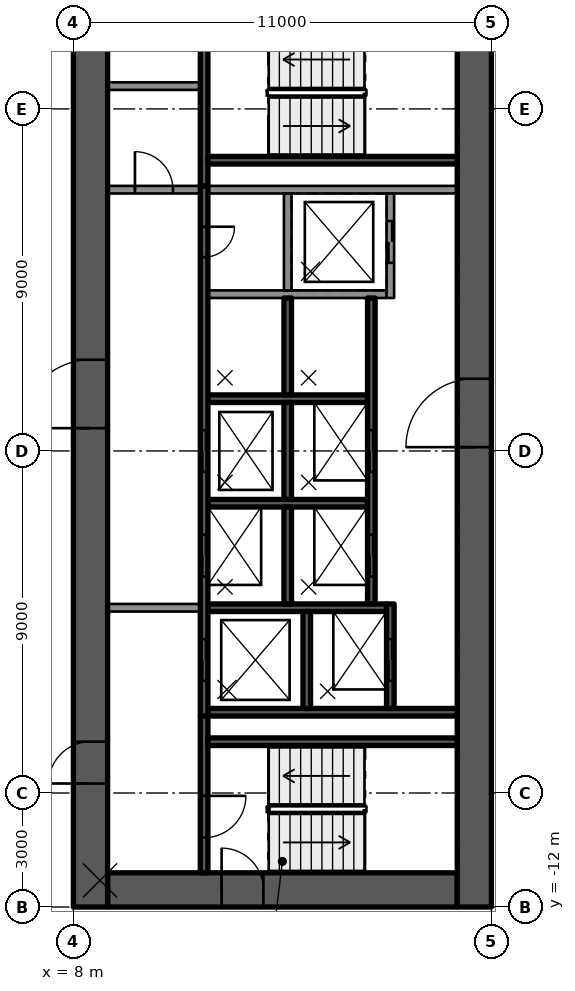
"""IFC4 building model, lengths in metres.
Left out: names, types, materials, properties, quantities, classifications, styles, units other than length and angle.
Written with IfcOpenShell. Run it as: python <this file> out.ifc"""

import sys

from ifc_helpers import new_model, si_unit, direction, frame, frame_2d, origin, place, context, subcontext, project, spatial, rectangle, extrude, element, fill, save


model = new_model("IFC4")
c1 = context("Model", 3, precision=1e-05, world=origin(), true_north=direction((0.0, 1.0)))
c2 = subcontext(c1, "Body", "Model", "MODEL_VIEW")
j1 = project(units=[si_unit("LENGTHUNIT", "METRE"), si_unit("PLANEANGLEUNIT", "RADIAN")], contexts=[c1])
p1 = place(None, origin())
s1 = spatial("IfcSite", under=j1, at=p1, CompositionType="ELEMENT")
p2 = place(p1, origin())
s2 = spatial("IfcBuilding", under=s1, at=p2, CompositionType="ELEMENT")
p3 = place(p2, frame((0.0, 0.0, 134.2)))
s3 = spatial("IfcBuildingStorey", under=s2, at=p3, CompositionType="ELEMENT", Elevation=134.2)
p4 = place(p3, frame((8.9, -11.55, 0.0), z_axis=(0.0, 0.0, 1.0), x_axis=(1.0, 0.0, 0.0)))
e1 = element("IfcWall", 1, at=p4, inside=s3, PredefinedType="SHEAR", context=c2, shape_type="SweptSolid", body=[
    extrude(rectangle(XDim=9.2, YDim=0.9, at=frame_2d((4.6, 0.0))), origin(), (0.0, 0.0, 1.0), 3.5),
])
p5 = place(p4, frame((3.0, 0.0, 0.0)))
e2 = element("IfcOpeningElement", 2, at=p5, cuts=e1, PredefinedType="OPENING", context=c2, shape_type="SweptSolid", body=[
    extrude(rectangle(XDim=1.1, YDim=2.1, at=frame_2d((0.55, 1.05))), frame((0.0, 0.46, 0.0), z_axis=(0.0, -1.0, 0.0), x_axis=(1.0, 0.0, 0.0)), (0.0, 0.0, 1.0), 0.92),
])
p6 = place(p3, frame((8.45, -12.0, 0.0), z_axis=(0.0, 0.0, 1.0), x_axis=(0.0, 1.0, 0.0)))
e3 = element("IfcWall", 3, at=p6, inside=s3, PredefinedType="SHEAR", context=c2, shape_type="SweptSolid", body=[
    extrude(rectangle(XDim=24.0, YDim=0.9, at=frame_2d((12.0, 0.0))), origin(), (0.0, 0.0, 1.0), 3.5),
])
p7 = place(p6, frame((12.6, 0.0, 0.0)))
e4 = element("IfcOpeningElement", 4, at=p7, cuts=e3, PredefinedType="OPENING", context=c2, shape_type="SweptSolid", body=[
    extrude(rectangle(XDim=1.8, YDim=2.1, at=frame_2d((0.9, 1.05))), frame((0.0, 0.46, 0.0), z_axis=(0.0, -1.0, 0.0), x_axis=(1.0, 0.0, 0.0)), (0.0, 0.0, 1.0), 0.92),
])
p8 = place(p6, frame((3.25, 0.0, 0.0)))
e5 = element("IfcOpeningElement", 5, at=p8, cuts=e3, PredefinedType="OPENING", context=c2, shape_type="SweptSolid", body=[
    extrude(rectangle(XDim=1.1, YDim=2.1, at=frame_2d((0.55, 1.05))), frame((0.0, 0.46, 0.0), z_axis=(0.0, -1.0, 0.0), x_axis=(1.0, 0.0, 0.0)), (0.0, 0.0, 1.0), 0.92),
])
p9 = place(p3, frame((18.55, -12.0, 0.0), z_axis=(0.0, 0.0, 1.0), x_axis=(0.0, 1.0, 0.0)))
e6 = element("IfcWall", 6, at=p9, inside=s3, PredefinedType="SHEAR", context=c2, shape_type="SweptSolid", body=[
    extrude(rectangle(XDim=24.0, YDim=0.9, at=frame_2d((12.0, 0.0))), origin(), (0.0, 0.0, 1.0), 3.5),
])
p10 = place(p9, frame((12.1, 0.0, 0.0)))
e7 = element("IfcOpeningElement", 7, at=p10, cuts=e6, PredefinedType="OPENING", context=c2, shape_type="SweptSolid", body=[
    extrude(rectangle(XDim=1.8, YDim=2.1, at=frame_2d((0.9, 1.05))), frame((0.0, 0.46, 0.0), z_axis=(0.0, -1.0, 0.0), x_axis=(1.0, 0.0, 0.0)), (0.0, 0.0, 1.0), 0.92),
])
for number, where, z_axis, x_axis in (
    (8, (11.54, -6.875, 0.0), (0.0, 0.0, 1.0), (1.0, 0.0, 0.0)),
    (9, (11.54, 6.875, 0.0), (0.0, 0.0, 1.0), (1.0, 0.0, 0.0)),
):
    element("IfcWall", number, at=place(p3, frame(where, z_axis=z_axis, x_axis=x_axis)), inside=s3, PredefinedType="SOLIDWALL", context=c2, shape_type="SweptSolid", body=[
        extrude(rectangle(XDim=6.56, YDim=0.2, at=frame_2d((3.28, 0.0))), origin(), (0.0, 0.0, 1.0), 3.09),
    ])
p11 = place(p3, frame((11.54, 4.125, 0.0), z_axis=(0.0, 0.0, 1.0), x_axis=(1.0, 0.0, 0.0)))
e10 = element("IfcWall", 10, at=p11, inside=s3, PredefinedType="SOLIDWALL", context=c2, shape_type="SweptSolid", body=[
    extrude(rectangle(XDim=4.7, YDim=0.2, at=frame_2d((2.35, 0.0))), origin(), (0.0, 0.0, 1.0), 3.09),
])
for number, where, z_axis, x_axis in (
    (11, (11.54, 1.375, 0.0), (0.0, 0.0, 1.0), (1.0, 0.0, 0.0)),
    (12, (11.54, -1.375, 0.0), (0.0, 0.0, 1.0), (1.0, 0.0, 0.0)),
):
    element("IfcWall", number, at=place(p3, frame(where, z_axis=z_axis, x_axis=x_axis)), inside=s3, PredefinedType="SOLIDWALL", context=c2, shape_type="SweptSolid", body=[
        extrude(rectangle(XDim=4.2, YDim=0.2, at=frame_2d((2.1, 0.0))), origin(), (0.0, 0.0, 1.0), 3.09),
    ])
p12 = place(p3, frame((11.54, -4.125, 0.0), z_axis=(0.0, 0.0, 1.0), x_axis=(1.0, 0.0, 0.0)))
e13 = element("IfcWall", 13, at=p12, inside=s3, PredefinedType="SOLIDWALL", context=c2, shape_type="SweptSolid", body=[
    extrude(rectangle(XDim=4.7, YDim=0.2, at=frame_2d((2.35, 0.0))), origin(), (0.0, 0.0, 1.0), 3.09),
])
p13 = place(p3, frame((11.44, 6.975, 0.0), z_axis=(0.0, 0.0, 1.0), x_axis=(0.0, -1.0, 0.0)))
e14 = element("IfcWall", 14, at=p13, inside=s3, PredefinedType="SOLIDWALL", context=c2, shape_type="SweptSolid", body=[
    extrude(rectangle(XDim=13.95, YDim=0.2, at=frame_2d((6.975, 0.0))), origin(), (0.0, 0.0, 1.0), 3.09),
])
p14 = place(p13, frame((6.425, 0.0, 0.0)))
e15 = element("IfcOpeningElement", 15, at=p14, cuts=e14, PredefinedType="OPENING", context=c2, shape_type="SweptSolid", body=[
    extrude(rectangle(XDim=1.1, YDim=2.1, at=frame_2d((0.55, 1.05))), frame((0.0, 0.11, 0.0), z_axis=(0.0, -1.0, 0.0), x_axis=(1.0, 0.0, 0.0)), (0.0, 0.0, 1.0), 0.22),
])
p15 = place(p13, frame((9.175, 0.0, 0.0)))
e16 = element("IfcOpeningElement", 16, at=p15, cuts=e14, PredefinedType="OPENING", context=c2, shape_type="SweptSolid", body=[
    extrude(rectangle(XDim=1.1, YDim=2.1, at=frame_2d((0.55, 1.05))), frame((0.0, 0.11, 0.0), z_axis=(0.0, -1.0, 0.0), x_axis=(1.0, 0.0, 0.0)), (0.0, 0.0, 1.0), 0.22),
])
p16 = place(p13, frame((11.925, 0.0, 0.0)))
e17 = element("IfcOpeningElement", 17, at=p16, cuts=e14, PredefinedType="OPENING", context=c2, shape_type="SweptSolid", body=[
    extrude(rectangle(XDim=1.1, YDim=2.1, at=frame_2d((0.55, 1.05))), frame((0.0, 0.11, 0.0), z_axis=(0.0, -1.0, 0.0), x_axis=(1.0, 0.0, 0.0)), (0.0, 0.0, 1.0), 0.22),
])
p17 = place(p13, frame((1.075, 0.0, 0.0)))
e18 = element("IfcOpeningElement", 18, at=p17, cuts=e14, PredefinedType="OPENING", context=c2, shape_type="SweptSolid", body=[
    extrude(rectangle(XDim=0.8, YDim=2.1, at=frame_2d((0.4, 1.05))), frame((0.0, 0.11, 0.0), z_axis=(0.0, -1.0, 0.0), x_axis=(1.0, 0.0, 0.0)), (0.0, 0.0, 1.0), 0.22),
])
for number, where, z_axis, x_axis in (
    (19, (13.64, 6.775, 0.0), (0.0, 0.0, 1.0), (0.0, -1.0, 0.0)),
    (20, (13.64, 4.025, 0.0), (0.0, 0.0, 1.0), (0.0, -1.0, 0.0)),
    (21, (13.64, 1.275, 0.0), (0.0, 0.0, 1.0), (0.0, -1.0, 0.0)),
    (22, (13.64, -1.475, 0.0), (0.0, 0.0, 1.0), (0.0, -1.0, 0.0)),
    (23, (14.14, -4.225, 0.0), (0.0, 0.0, 1.0), (0.0, -1.0, 0.0)),
):
    element("IfcWall", number, at=place(p3, frame(where, z_axis=z_axis, x_axis=x_axis)), inside=s3, PredefinedType="SOLIDWALL", context=c2, shape_type="SweptSolid", body=[
        extrude(rectangle(XDim=2.55, YDim=0.2, at=frame_2d((1.275, 0.0))), origin(), (0.0, 0.0, 1.0), 3.09),
    ])
p18 = place(p3, frame((16.34, 6.775, 0.0), z_axis=(0.0, 0.0, 1.0), x_axis=(0.0, -1.0, 0.0)))
e24 = element("IfcWall", 24, at=p18, inside=s3, PredefinedType="SOLIDWALL", context=c2, shape_type="SweptSolid", body=[
    extrude(rectangle(XDim=2.75, YDim=0.2, at=frame_2d((1.375, 0.0))), origin(), (0.0, 0.0, 1.0), 3.09),
])
p19 = place(p18, frame((0.725, 0.0, 0.0)))
e25 = element("IfcOpeningElement", 25, at=p19, cuts=e24, PredefinedType="OPENING", context=c2, shape_type="SweptSolid", body=[
    extrude(rectangle(XDim=1.1, YDim=2.1, at=frame_2d((0.55, 1.05))), frame((0.0, 0.11, 0.0), z_axis=(0.0, -1.0, 0.0), x_axis=(1.0, 0.0, 0.0)), (0.0, 0.0, 1.0), 0.22),
])
p20 = place(p3, frame((15.84, 4.025, 0.0), z_axis=(0.0, 0.0, 1.0), x_axis=(0.0, -1.0, 0.0)))
e26 = element("IfcWall", 26, at=p20, inside=s3, PredefinedType="SOLIDWALL", context=c2, shape_type="SweptSolid", body=[
    extrude(rectangle(XDim=8.05, YDim=0.2, at=frame_2d((4.025, 0.0))), origin(), (0.0, 0.0, 1.0), 3.09),
])
p21 = place(p20, frame((3.475, 0.0, 0.0)))
e27 = element("IfcOpeningElement", 27, at=p21, cuts=e26, PredefinedType="OPENING", context=c2, shape_type="SweptSolid", body=[
    extrude(rectangle(XDim=1.1, YDim=2.1, at=frame_2d((0.55, 1.05))), frame((0.0, 0.11, 0.0), z_axis=(0.0, -1.0, 0.0), x_axis=(1.0, 0.0, 0.0)), (0.0, 0.0, 1.0), 0.22),
])
p22 = place(p20, frame((6.225, 0.0, 0.0)))
e28 = element("IfcOpeningElement", 28, at=p22, cuts=e26, PredefinedType="OPENING", context=c2, shape_type="SweptSolid", body=[
    extrude(rectangle(XDim=1.1, YDim=2.1, at=frame_2d((0.55, 1.05))), frame((0.0, 0.11, 0.0), z_axis=(0.0, -1.0, 0.0), x_axis=(1.0, 0.0, 0.0)), (0.0, 0.0, 1.0), 0.22),
])
p23 = place(p3, frame((16.34, -4.025, 0.0), z_axis=(0.0, 0.0, 1.0), x_axis=(0.0, -1.0, 0.0)))
e29 = element("IfcWall", 29, at=p23, inside=s3, PredefinedType="SOLIDWALL", context=c2, shape_type="SweptSolid", body=[
    extrude(rectangle(XDim=2.75, YDim=0.2, at=frame_2d((1.375, 0.0))), origin(), (0.0, 0.0, 1.0), 3.09),
])
p24 = place(p23, frame((0.925, 0.0, 0.0)))
e30 = element("IfcOpeningElement", 30, at=p24, cuts=e29, PredefinedType="OPENING", context=c2, shape_type="SweptSolid", body=[
    extrude(rectangle(XDim=1.1, YDim=2.1, at=frame_2d((0.55, 1.05))), frame((0.0, 0.11, 0.0), z_axis=(0.0, -1.0, 0.0), x_axis=(1.0, 0.0, 0.0)), (0.0, 0.0, 1.0), 0.22),
])
p25 = place(p3, frame((11.44, -6.975, 0.0), z_axis=(0.0, 0.0, 1.0), x_axis=(0.0, -1.0, 0.0)))
e31 = element("IfcWall", 31, at=p25, inside=s3, PredefinedType="SOLIDWALL", context=c2, shape_type="SweptSolid", body=[
    extrude(rectangle(XDim=4.125, YDim=0.2, at=frame_2d((2.062, 0.0))), origin(), (0.0, 0.0, 1.0), 3.09),
])
p26 = place(p25, frame((2.1, 0.0, 0.0)))
e32 = element("IfcOpeningElement", 32, at=p26, cuts=e31, PredefinedType="OPENING", context=c2, shape_type="SweptSolid", body=[
    extrude(rectangle(XDim=1.1, YDim=2.1, at=frame_2d((0.55, 1.05))), frame((0.0, 0.11, 0.0), z_axis=(0.0, -1.0, 0.0), x_axis=(1.0, 0.0, 0.0)), (0.0, 0.0, 1.0), 0.22),
])
p27 = place(p3, frame((11.54, -7.65, 0.0), z_axis=(0.0, 0.0, 1.0), x_axis=(1.0, 0.0, 0.0)))
e33 = element("IfcWall", 33, at=p27, inside=s3, PredefinedType="SOLIDWALL", context=c2, shape_type="SweptSolid", body=[
    extrude(rectangle(XDim=6.56, YDim=0.2, at=frame_2d((3.28, 0.0))), origin(), (0.0, 0.0, 1.0), 3.09),
])
p28 = place(p3, frame((11.44, 11.1, 0.0), z_axis=(0.0, 0.0, 1.0), x_axis=(0.0, -1.0, 0.0)))
e34 = element("IfcWall", 34, at=p28, inside=s3, PredefinedType="SOLIDWALL", context=c2, shape_type="SweptSolid", body=[
    extrude(rectangle(XDim=4.125, YDim=0.2, at=frame_2d((2.062, 0.0))), origin(), (0.0, 0.0, 1.0), 3.09),
])
p29 = place(p3, frame((11.54, 7.65, 0.0), z_axis=(0.0, 0.0, 1.0), x_axis=(1.0, 0.0, 0.0)))
e35 = element("IfcWall", 35, at=p29, inside=s3, PredefinedType="SOLIDWALL", context=c2, shape_type="SweptSolid", body=[
    extrude(rectangle(XDim=6.56, YDim=0.2, at=frame_2d((3.28, 0.0))), origin(), (0.0, 0.0, 1.0), 3.09),
])
p30 = place(p3, frame((8.9, -4.125, 0.0), z_axis=(0.0, 0.0, 1.0), x_axis=(1.0, 0.0, 0.0)))
e36 = element("IfcWall", 36, at=p30, inside=s3, PredefinedType="PARTITIONING", context=c2, shape_type="SweptSolid", body=[
    extrude(rectangle(XDim=2.44, YDim=0.2, at=frame_2d((1.22, 0.0))), origin(), (0.0, 0.0, 1.0), 3.09),
])
p31 = place(p3, frame((8.9, 6.875, 0.0), z_axis=(0.0, 0.0, 1.0), x_axis=(1.0, 0.0, 0.0)))
e37 = element("IfcWall", 37, at=p31, inside=s3, PredefinedType="PARTITIONING", context=c2, shape_type="SweptSolid", body=[
    extrude(rectangle(XDim=2.44, YDim=0.2, at=frame_2d((1.22, 0.0))), origin(), (0.0, 0.0, 1.0), 3.09),
])
p32 = place(p31, frame((0.72, 0.0, 0.0)))
e38 = element("IfcOpeningElement", 38, at=p32, cuts=e37, PredefinedType="OPENING", context=c2, shape_type="SweptSolid", body=[
    extrude(rectangle(XDim=1.0, YDim=2.1, at=frame_2d((0.5, 1.05))), frame((0.0, 0.11, 0.0), z_axis=(0.0, -1.0, 0.0), x_axis=(1.0, 0.0, 0.0)), (0.0, 0.0, 1.0), 0.22),
])
p33 = place(p3, frame((8.9, 9.6, 0.0), z_axis=(0.0, 0.0, 1.0), x_axis=(1.0, 0.0, 0.0)))
e39 = element("IfcWall", 39, at=p33, inside=s3, PredefinedType="PARTITIONING", context=c2, shape_type="SweptSolid", body=[
    extrude(rectangle(XDim=2.44, YDim=0.2, at=frame_2d((1.22, 0.0))), origin(), (0.0, 0.0, 1.0), 3.09),
])
p34 = place(p19, origin())
e40 = element("IfcDoor", 40, at=p34, inside=s3, OperationType="DOUBLE_DOOR_SLIDING", PredefinedType="DOOR", context=c2, shape_type="SweptSolid", body=[
    extrude(rectangle(XDim=1.1, YDim=2.1, at=frame_2d((0.55, 1.05))), frame((0.0, 0.025, 0.0), z_axis=(0.0, -1.0, 0.0), x_axis=(1.0, 0.0, 0.0)), (0.0, 0.0, 1.0), 0.05),
])
fill(e25, e40)
p35 = place(p14, origin())
e41 = element("IfcDoor", 41, at=p35, inside=s3, OperationType="DOUBLE_DOOR_SLIDING", PredefinedType="DOOR", context=c2, shape_type="SweptSolid", body=[
    extrude(rectangle(XDim=1.1, YDim=2.1, at=frame_2d((0.55, 1.05))), frame((0.0, 0.025, 0.0), z_axis=(0.0, -1.0, 0.0), x_axis=(1.0, 0.0, 0.0)), (0.0, 0.0, 1.0), 0.05),
])
fill(e15, e41)
p36 = place(p21, origin())
e42 = element("IfcDoor", 42, at=p36, inside=s3, OperationType="DOUBLE_DOOR_SLIDING", PredefinedType="DOOR", context=c2, shape_type="SweptSolid", body=[
    extrude(rectangle(XDim=1.1, YDim=2.1, at=frame_2d((0.55, 1.05))), frame((0.0, 0.025, 0.0), z_axis=(0.0, -1.0, 0.0), x_axis=(1.0, 0.0, 0.0)), (0.0, 0.0, 1.0), 0.05),
])
fill(e27, e42)
p37 = place(p15, origin())
e43 = element("IfcDoor", 43, at=p37, inside=s3, OperationType="DOUBLE_DOOR_SLIDING", PredefinedType="DOOR", context=c2, shape_type="SweptSolid", body=[
    extrude(rectangle(XDim=1.1, YDim=2.1, at=frame_2d((0.55, 1.05))), frame((0.0, 0.025, 0.0), z_axis=(0.0, -1.0, 0.0), x_axis=(1.0, 0.0, 0.0)), (0.0, 0.0, 1.0), 0.05),
])
fill(e16, e43)
p38 = place(p22, origin())
e44 = element("IfcDoor", 44, at=p38, inside=s3, OperationType="DOUBLE_DOOR_SLIDING", PredefinedType="DOOR", context=c2, shape_type="SweptSolid", body=[
    extrude(rectangle(XDim=1.1, YDim=2.1, at=frame_2d((0.55, 1.05))), frame((0.0, 0.025, 0.0), z_axis=(0.0, -1.0, 0.0), x_axis=(1.0, 0.0, 0.0)), (0.0, 0.0, 1.0), 0.05),
])
fill(e28, e44)
p39 = place(p16, origin())
e45 = element("IfcDoor", 45, at=p39, inside=s3, OperationType="DOUBLE_DOOR_SLIDING", PredefinedType="DOOR", context=c2, shape_type="SweptSolid", body=[
    extrude(rectangle(XDim=1.1, YDim=2.1, at=frame_2d((0.55, 1.05))), frame((0.0, 0.025, 0.0), z_axis=(0.0, -1.0, 0.0), x_axis=(1.0, 0.0, 0.0)), (0.0, 0.0, 1.0), 0.05),
])
fill(e17, e45)
p40 = place(p24, origin())
e46 = element("IfcDoor", 46, at=p40, inside=s3, OperationType="DOUBLE_DOOR_SLIDING", PredefinedType="DOOR", context=c2, shape_type="SweptSolid", body=[
    extrude(rectangle(XDim=1.1, YDim=2.1, at=frame_2d((0.55, 1.05))), frame((0.0, 0.025, 0.0), z_axis=(0.0, -1.0, 0.0), x_axis=(1.0, 0.0, 0.0)), (0.0, 0.0, 1.0), 0.05),
])
fill(e30, e46)
p41 = place(p17, origin())
e47 = element("IfcDoor", 47, at=p41, inside=s3, OperationType="SINGLE_SWING_LEFT", PredefinedType="DOOR", context=c2, shape_type="SweptSolid", body=[
    extrude(rectangle(XDim=0.8, YDim=2.1, at=frame_2d((0.4, 1.05))), frame((0.0, 0.025, 0.0), z_axis=(0.0, -1.0, 0.0), x_axis=(1.0, 0.0, 0.0)), (0.0, 0.0, 1.0), 0.05),
])
fill(e18, e47)
p42 = place(p7, origin())
e48 = element("IfcDoor", 48, at=p42, inside=s3, OperationType="SINGLE_SWING_RIGHT", PredefinedType="DOOR", context=c2, shape_type="SweptSolid", body=[
    extrude(rectangle(XDim=1.8, YDim=2.1, at=frame_2d((0.9, 1.05))), frame((0.0, 0.025, 0.0), z_axis=(0.0, -1.0, 0.0), x_axis=(1.0, 0.0, 0.0)), (0.0, 0.0, 1.0), 0.05),
])
fill(e4, e48)
p43 = place(p10, origin())
e49 = element("IfcDoor", 49, at=p43, inside=s3, OperationType="SINGLE_SWING_RIGHT", PredefinedType="DOOR", context=c2, shape_type="SweptSolid", body=[
    extrude(rectangle(XDim=1.8, YDim=2.1, at=frame_2d((0.9, 1.05))), frame((0.0, 0.025, 0.0), z_axis=(0.0, -1.0, 0.0), x_axis=(1.0, 0.0, 0.0)), (0.0, 0.0, 1.0), 0.05),
])
fill(e7, e49)
p44 = place(p8, origin())
e50 = element("IfcDoor", 50, at=p44, inside=s3, OperationType="SINGLE_SWING_LEFT", PredefinedType="DOOR", context=c2, shape_type="SweptSolid", body=[
    extrude(rectangle(XDim=1.1, YDim=2.1, at=frame_2d((0.55, 1.05))), frame((0.0, 0.025, 0.0), z_axis=(0.0, -1.0, 0.0), x_axis=(1.0, 0.0, 0.0)), (0.0, 0.0, 1.0), 0.05),
])
fill(e5, e50)
p45 = place(p5, origin())
e51 = element("IfcDoor", 51, at=p45, inside=s3, OperationType="SINGLE_SWING_LEFT", PredefinedType="DOOR", context=c2, shape_type="SweptSolid", body=[
    extrude(rectangle(XDim=1.1, YDim=2.1, at=frame_2d((0.55, 1.05))), frame((0.0, 0.025, 0.0), z_axis=(0.0, -1.0, 0.0), x_axis=(1.0, 0.0, 0.0)), (0.0, 0.0, 1.0), 0.05),
])
fill(e2, e51)
p46 = place(p26, origin())
e52 = element("IfcDoor", 52, at=p46, inside=s3, OperationType="SINGLE_SWING_RIGHT", PredefinedType="DOOR", context=c2, shape_type="SweptSolid", body=[
    extrude(rectangle(XDim=1.1, YDim=2.1, at=frame_2d((0.55, 1.05))), frame((0.0, 0.025, 0.0), z_axis=(0.0, -1.0, 0.0), x_axis=(1.0, 0.0, 0.0)), (0.0, 0.0, 1.0), 0.05),
])
fill(e32, e52)
p47 = place(p32, origin())
e53 = element("IfcDoor", 53, at=p47, inside=s3, OperationType="SINGLE_SWING_RIGHT", PredefinedType="DOOR", context=c2, shape_type="SweptSolid", body=[
    extrude(rectangle(XDim=1.0, YDim=2.1, at=frame_2d((0.5, 1.05))), frame((0.0, 0.025, 0.0), z_axis=(0.0, -1.0, 0.0), x_axis=(1.0, 0.0, 0.0)), (0.0, 0.0, 1.0), 0.05),
])
fill(e38, e53)
save(model, sys.argv[1])
